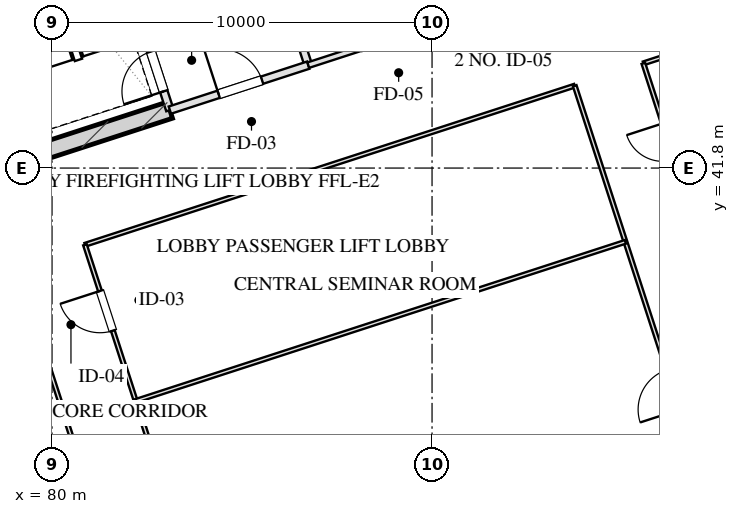
"""IFC4 building model, lengths in metres.
Left out: names, types, materials, properties, quantities, classifications, styles, units other than length and angle.
Written with IfcOpenShell. Run it as: python <this file> out.ifc"""

import sys

from ifc_helpers import new_model, si_unit, direction, frame, frame_2d, origin, place, context, subcontext, project, spatial, rectangle, extrude, element, fill, save


model = new_model("IFC4")
c1 = context("Model", 3, precision=1e-05, world=origin(), true_north=direction((0.0, 1.0)))
c2 = subcontext(c1, "Body", "Model", "MODEL_VIEW")
j1 = project(units=[si_unit("LENGTHUNIT", "METRE"), si_unit("PLANEANGLEUNIT", "RADIAN")], contexts=[c1])
p1 = place(None, origin())
s1 = spatial("IfcSite", under=j1, at=p1, CompositionType="ELEMENT")
p2 = place(p1, origin())
s2 = spatial("IfcBuilding", under=s1, at=p2, CompositionType="ELEMENT")
p3 = place(p2, frame((0.0, 0.0, 209.3)))
s3 = spatial("IfcBuildingStorey", under=s2, at=p3, CompositionType="ELEMENT", Elevation=209.3)
p4 = place(p3, frame((79.159, 42.043, 0.0), z_axis=(0.0, 0.0, 1.0), x_axis=(0.951047485828, 0.309044785913, 0.0)))
e1 = element("IfcWall", 1, at=p4, inside=s3, PredefinedType="SHEAR", context=c2, shape_type="SweptSolid", body=[
    extrude(rectangle(XDim=4.145, YDim=0.45, at=frame_2d((2.073, 0.0))), origin(), (0.0, 0.0, 1.0), 3.45),
])
p5 = place(p3, frame((82.618, 11.414, 0.0), z_axis=(0.0, 0.0, 1.0), x_axis=(-0.309016491071, 0.951056679828, 0.0)))
e2 = element("IfcWall", 2, at=p5, inside=s3, PredefinedType="SOLIDWALL", context=c2, shape_type="SweptSolid", body=[
    extrude(rectangle(XDim=38.4, YDim=0.4, at=frame_2d((19.2, 0.0))), origin(), (0.0, 0.0, 1.0), 2.61),
])
p6 = place(p5, frame((20.75, 0.0, 0.75)))
e3 = element("IfcOpeningElement", 3, at=p6, cuts=e2, PredefinedType="OPENING", context=c2, shape_type="SweptSolid", body=[
    extrude(rectangle(XDim=2.1, YDim=1.46, at=frame_2d((1.05, 0.73))), frame((0.0, 0.21, 0.0), z_axis=(0.0, -1.0, 0.0), x_axis=(1.0, 0.0, 0.0)), (0.0, 0.0, 1.0), 0.42),
])
p7 = place(p5, frame((24.55, 0.0, 0.75)))
e4 = element("IfcOpeningElement", 4, at=p7, cuts=e2, PredefinedType="OPENING", context=c2, shape_type="SweptSolid", body=[
    extrude(rectangle(XDim=2.1, YDim=1.46, at=frame_2d((1.05, 0.73))), frame((0.0, 0.21, 0.0), z_axis=(0.0, -1.0, 0.0), x_axis=(1.0, 0.0, 0.0)), (0.0, 0.0, 1.0), 0.42),
])
p8 = place(p5, frame((15.55, 0.0, 0.0)))
e5 = element("IfcOpeningElement", 5, at=p8, cuts=e2, PredefinedType="OPENING", context=c2, shape_type="SweptSolid", body=[
    extrude(rectangle(XDim=1.1, YDim=2.15, at=frame_2d((0.55, 1.075))), frame((0.0, 0.21, 0.0), z_axis=(0.0, -1.0, 0.0), x_axis=(1.0, 0.0, 0.0)), (0.0, 0.0, 1.0), 0.42),
])
p9 = place(p3, frame((83.101, 43.324, 0.0), z_axis=(0.0, 0.0, 1.0), x_axis=(-0.309048298632, 0.951046344356, 0.0)))
e6 = element("IfcWall", 6, at=p9, inside=s3, PredefinedType="PARTITIONING", context=c2, shape_type="SweptSolid", body=[
    extrude(rectangle(XDim=1.9, YDim=0.2, at=frame_2d((0.95, 0.0))), origin(), (0.0, 0.0, 1.0), 3.175),
])
p10 = place(p9, frame((0.52, 0.0, 0.0)))
e7 = element("IfcOpeningElement", 7, at=p10, cuts=e6, PredefinedType="OPENING", context=c2, shape_type="SweptSolid", body=[
    extrude(rectangle(XDim=1.1, YDim=2.05, at=frame_2d((0.55, 1.025))), frame((0.0, 0.11, 0.0), z_axis=(0.0, -1.0, 0.0), x_axis=(1.0, 0.0, 0.0)), (0.0, 0.0, 1.0), 0.22),
])
p11 = place(p3, frame((86.743, 44.508, 0.0), z_axis=(0.0, 0.0, 1.0), x_axis=(-0.309016001439, 0.951056838919, 0.0)))
e8 = element("IfcWall", 8, at=p11, inside=s3, PredefinedType="PARTITIONING", context=c2, shape_type="SweptSolid", body=[
    extrude(rectangle(XDim=8.43, YDim=0.2, at=frame_2d((4.215, 0.0))), origin(), (0.0, 0.0, 1.0), 3.175),
])
p12 = place(p3, frame((83.101, 43.324, 0.0), z_axis=(0.0, 0.0, 1.0), x_axis=(0.951052804469, 0.309028417967, 0.0)))
e9 = element("IfcWall", 9, at=p12, inside=s3, PredefinedType="PARTITIONING", context=c2, shape_type="SweptSolid", body=[
    extrude(rectangle(XDim=3.83, YDim=0.2, at=frame_2d((1.915, 0.0))), origin(), (0.0, 0.0, 1.0), 3.175),
])
p13 = place(p12, frame((1.35, 0.0, 0.0)))
e10 = element("IfcOpeningElement", 10, at=p13, cuts=e9, PredefinedType="OPENING", context=c2, shape_type="SweptSolid", body=[
    extrude(rectangle(XDim=1.2, YDim=2.05, at=frame_2d((0.6, 1.025))), frame((0.0, 0.11, 0.0), z_axis=(0.0, -1.0, 0.0), x_axis=(1.0, 0.0, 0.0)), (0.0, 0.0, 1.0), 0.22),
])
p14 = place(p3, frame((86.743, 44.508, 0.0), z_axis=(0.0, 0.0, 1.0), x_axis=(0.951063829732, 0.308994485023, 0.0)))
e11 = element("IfcWall", 11, at=p14, inside=s3, PredefinedType="PARTITIONING", context=c2, shape_type="SweptSolid", body=[
    extrude(rectangle(XDim=4.4, YDim=0.15, at=frame_2d((2.2, 0.0))), origin(), (0.0, 0.0, 1.0), 3.175),
])
p15 = place(p14, frame((1.45, 0.0, 0.0)))
e12 = element("IfcOpeningElement", 12, at=p15, cuts=e11, PredefinedType="OPENING", context=c2, shape_type="SweptSolid", body=[
    extrude(rectangle(XDim=1.5, YDim=2.05, at=frame_2d((0.75, 1.025))), frame((0.0, 0.085, 0.0), z_axis=(0.0, -1.0, 0.0), x_axis=(1.0, 0.0, 0.0)), (0.0, 0.0, 1.0), 0.17),
])
p16 = place(p3, frame((80.867, 39.781, 0.0), z_axis=(0.0, 0.0, 1.0), x_axis=(0.951054192928, 0.309024144872, 0.0)))
e13 = element("IfcWall", 13, at=p16, inside=s3, PredefinedType="MOVABLE", context=c2, shape_type="SweptSolid", body=[
    extrude(rectangle(XDim=13.55, YDim=0.1, at=frame_2d((6.775, 0.0))), origin(), (0.0, 0.0, 1.0), 3.175),
])
p17 = place(p3, frame((95.561, 44.555, 0.0), z_axis=(0.0, 0.0, 1.0), x_axis=(0.951055596592, 0.309019824916, 0.0)))
e14 = element("IfcWall", 14, at=p17, inside=s3, PredefinedType="MOVABLE", context=c2, shape_type="SweptSolid", body=[
    extrude(rectangle(XDim=5.25, YDim=0.1, at=frame_2d((2.625, 0.0))), origin(), (0.0, 0.0, 1.0), 3.175),
])
p18 = place(p3, frame((84.202, 23.368, 0.0), z_axis=(0.0, 0.0, 1.0), x_axis=(-0.309022042254, 0.951054876125, 0.0)))
e15 = element("IfcWall", 15, at=p18, inside=s3, PredefinedType="MOVABLE", context=c2, shape_type="SweptSolid", body=[
    extrude(rectangle(XDim=16.64, YDim=0.1, at=frame_2d((8.32, 0.0))), origin(), (0.0, 0.0, 1.0), 3.175),
])
p19 = place(p18, frame((1.16, 0.0, 0.0)))
e16 = element("IfcOpeningElement", 16, at=p19, cuts=e15, PredefinedType="OPENING", context=c2, shape_type="SweptSolid", body=[
    extrude(rectangle(XDim=1.0, YDim=2.05, at=frame_2d((0.5, 1.025))), frame((0.0, 0.06, 0.0), z_axis=(0.0, -1.0, 0.0), x_axis=(1.0, 0.0, 0.0)), (0.0, 0.0, 1.0), 0.12),
])
p20 = place(p18, frame((4.72, 0.0, 0.0)))
e17 = element("IfcOpeningElement", 17, at=p20, cuts=e15, PredefinedType="OPENING", context=c2, shape_type="SweptSolid", body=[
    extrude(rectangle(XDim=1.0, YDim=2.05, at=frame_2d((0.5, 1.025))), frame((0.0, 0.06, 0.0), z_axis=(0.0, -1.0, 0.0), x_axis=(1.0, 0.0, 0.0)), (0.0, 0.0, 1.0), 0.12),
])
p21 = place(p18, frame((7.748, 0.0, 0.0)))
e18 = element("IfcOpeningElement", 18, at=p21, cuts=e15, PredefinedType="OPENING", context=c2, shape_type="SweptSolid", body=[
    extrude(rectangle(XDim=1.0, YDim=2.05, at=frame_2d((0.5, 1.025))), frame((0.0, 0.06, 0.0), z_axis=(0.0, -1.0, 0.0), x_axis=(1.0, 0.0, 0.0)), (0.0, 0.0, 1.0), 0.12),
])
p22 = place(p18, frame((10.623, 0.0, 0.0)))
e19 = element("IfcOpeningElement", 19, at=p22, cuts=e15, PredefinedType="OPENING", context=c2, shape_type="SweptSolid", body=[
    extrude(rectangle(XDim=0.85, YDim=2.05, at=frame_2d((0.425, 1.025))), frame((0.0, 0.06, 0.0), z_axis=(0.0, -1.0, 0.0), x_axis=(1.0, 0.0, 0.0)), (0.0, 0.0, 1.0), 0.12),
])
p23 = place(p18, frame((14.255, 0.0, 0.0)))
e20 = element("IfcOpeningElement", 20, at=p23, cuts=e15, PredefinedType="OPENING", context=c2, shape_type="SweptSolid", body=[
    extrude(rectangle(XDim=1.0, YDim=2.05, at=frame_2d((0.5, 1.025))), frame((0.0, 0.06, 0.0), z_axis=(0.0, -1.0, 0.0), x_axis=(1.0, 0.0, 0.0)), (0.0, 0.0, 1.0), 0.12),
])
p24 = place(p3, frame((86.009, 23.955, 0.0), z_axis=(0.0, 0.0, 1.0), x_axis=(-0.309022042254, 0.951054876125, 0.0)))
e21 = element("IfcWall", 21, at=p24, inside=s3, PredefinedType="MOVABLE", context=c2, shape_type="SweptSolid", body=[
    extrude(rectangle(XDim=16.64, YDim=0.1, at=frame_2d((8.32, 0.0))), origin(), (0.0, 0.0, 1.0), 3.175),
])
p25 = place(p24, frame((1.944, 0.0, 0.0)))
e22 = element("IfcOpeningElement", 22, at=p25, cuts=e21, PredefinedType="OPENING", context=c2, shape_type="SweptSolid", body=[
    extrude(rectangle(XDim=1.1, YDim=2.05, at=frame_2d((0.55, 1.025))), frame((0.0, 0.06, 0.0), z_axis=(0.0, -1.0, 0.0), x_axis=(1.0, 0.0, 0.0)), (0.0, 0.0, 1.0), 0.12),
])
p26 = place(p24, frame((14.264, 0.0, 0.0)))
e23 = element("IfcOpeningElement", 23, at=p26, cuts=e21, PredefinedType="OPENING", context=c2, shape_type="SweptSolid", body=[
    extrude(rectangle(XDim=1.1, YDim=2.05, at=frame_2d((0.55, 1.025))), frame((0.0, 0.06, 0.0), z_axis=(0.0, -1.0, 0.0), x_axis=(1.0, 0.0, 0.0)), (0.0, 0.0, 1.0), 0.12),
])
p27 = place(p3, frame((98.896, 28.142, 0.0), z_axis=(0.0, 0.0, 1.0), x_axis=(-0.30901773025, 0.951056277195, 0.0)))
e24 = element("IfcWall", 24, at=p27, inside=s3, PredefinedType="MOVABLE", context=c2, shape_type="SweptSolid", body=[
    extrude(rectangle(XDim=16.64, YDim=0.1, at=frame_2d((8.32, 0.0))), origin(), (0.0, 0.0, 1.0), 3.175),
])
p28 = place(p27, frame((7.68, 0.0, 0.0)))
e25 = element("IfcOpeningElement", 25, at=p28, cuts=e24, PredefinedType="OPENING", context=c2, shape_type="SweptSolid", body=[
    extrude(rectangle(XDim=1.1, YDim=2.05, at=frame_2d((0.55, 1.025))), frame((0.0, 0.06, 0.0), z_axis=(0.0, -1.0, 0.0), x_axis=(1.0, 0.0, 0.0)), (0.0, 0.0, 1.0), 0.12),
])
p29 = place(p3, frame((100.703, 28.729, 0.0), z_axis=(0.0, 0.0, 1.0), x_axis=(-0.30901773025, 0.951056277195, 0.0)))
e26 = element("IfcWall", 26, at=p29, inside=s3, PredefinedType="MOVABLE", context=c2, shape_type="SweptSolid", body=[
    extrude(rectangle(XDim=16.64, YDim=0.1, at=frame_2d((8.32, 0.0))), origin(), (0.0, 0.0, 1.0), 3.175),
])
p30 = place(p29, frame((3.06, 0.0, 0.0)))
e27 = element("IfcOpeningElement", 27, at=p30, cuts=e26, PredefinedType="OPENING", context=c2, shape_type="SweptSolid", body=[
    extrude(rectangle(XDim=1.0, YDim=2.05, at=frame_2d((0.5, 1.025))), frame((0.0, 0.06, 0.0), z_axis=(0.0, -1.0, 0.0), x_axis=(1.0, 0.0, 0.0)), (0.0, 0.0, 1.0), 0.12),
])
p31 = place(p29, frame((9.22, 0.0, 0.0)))
e28 = element("IfcOpeningElement", 28, at=p31, cuts=e26, PredefinedType="OPENING", context=c2, shape_type="SweptSolid", body=[
    extrude(rectangle(XDim=1.0, YDim=2.05, at=frame_2d((0.5, 1.025))), frame((0.0, 0.06, 0.0), z_axis=(0.0, -1.0, 0.0), x_axis=(1.0, 0.0, 0.0)), (0.0, 0.0, 1.0), 0.12),
])
p32 = place(p29, frame((13.98, 0.0, 0.0)))
e29 = element("IfcOpeningElement", 29, at=p32, cuts=e26, PredefinedType="OPENING", context=c2, shape_type="SweptSolid", body=[
    extrude(rectangle(XDim=1.0, YDim=2.05, at=frame_2d((0.5, 1.025))), frame((0.0, 0.06, 0.0), z_axis=(0.0, -1.0, 0.0), x_axis=(1.0, 0.0, 0.0)), (0.0, 0.0, 1.0), 0.12),
])
p33 = place(p3, frame((82.202, 35.672, 0.0), z_axis=(0.0, 0.0, 1.0), x_axis=(0.951059488241, 0.309007847517, 0.0)))
e30 = element("IfcWall", 30, at=p33, inside=s3, PredefinedType="MOVABLE", context=c2, shape_type="SweptSolid", body=[
    extrude(rectangle(XDim=13.55, YDim=0.1, at=frame_2d((6.775, 0.0))), origin(), (0.0, 0.0, 1.0), 3.175),
])
p34 = place(p3, frame((75.469, 34.063, 0.0), z_axis=(0.0, 0.0, 1.0), x_axis=(0.951053443117, 0.309026452484, 0.0)))
e31 = element("IfcWall", 31, at=p34, inside=s3, PredefinedType="MOVABLE", context=c2, shape_type="SweptSolid", body=[
    extrude(rectangle(XDim=5.0, YDim=0.1, at=frame_2d((2.5, 0.0))), origin(), (0.0, 0.0, 1.0), 3.175),
])
p35 = place(p10, origin())
e32 = element("IfcDoor", 32, at=p35, inside=s3, OperationType="SINGLE_SWING_LEFT", PredefinedType="DOOR", context=c2, shape_type="SweptSolid", body=[
    extrude(rectangle(XDim=1.1, YDim=2.05, at=frame_2d((0.55, 1.025))), frame((0.0, 0.025, 0.0), z_axis=(0.0, -1.0, 0.0), x_axis=(1.0, 0.0, 0.0)), (0.0, 0.0, 1.0), 0.05),
])
fill(e7, e32)
p36 = place(p13, origin())
e33 = element("IfcDoor", 33, at=p36, inside=s3, OperationType="SINGLE_SWING_LEFT", PredefinedType="DOOR", context=c2, shape_type="SweptSolid", body=[
    extrude(rectangle(XDim=1.2, YDim=2.05, at=frame_2d((0.6, 1.025))), frame((0.0, 0.025, 0.0), z_axis=(0.0, -1.0, 0.0), x_axis=(1.0, 0.0, 0.0)), (0.0, 0.0, 1.0), 0.05),
])
fill(e10, e33)
p37 = place(p26, origin())
e34 = element("IfcDoor", 34, at=p37, inside=s3, OperationType="SINGLE_SWING_RIGHT", PredefinedType="DOOR", context=c2, shape_type="SweptSolid", body=[
    extrude(rectangle(XDim=1.1, YDim=2.05, at=frame_2d((0.55, 1.025))), frame((0.0, 0.025, 0.0), z_axis=(0.0, -1.0, 0.0), x_axis=(1.0, 0.0, 0.0)), (0.0, 0.0, 1.0), 0.05),
])
fill(e23, e34)
save(model, sys.argv[1])
